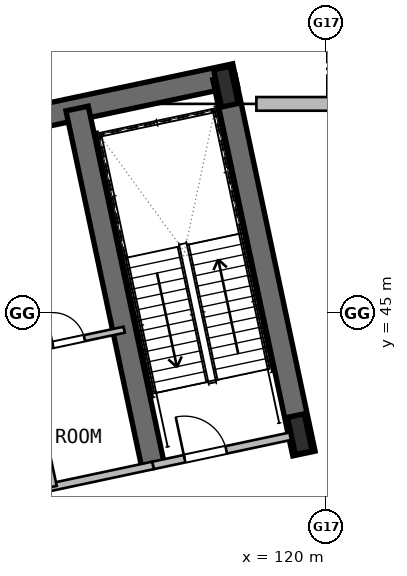
"""IFC4 building model, lengths in metres.
Left out: names, types, materials, properties, quantities, classifications, styles, units other than length and angle.
Written with IfcOpenShell. Run it as: python <this file> out.ifc"""

import sys

from ifc_helpers import new_model, si_unit, direction, frame, frame_2d, origin, origin_2d, place, context, subcontext, project, spatial, rectangle, i_section, extrude, element, fill, save


model = new_model("IFC4")
c1 = context("Model", 3, precision=1e-05, world=origin(), true_north=direction((0.0, 1.0)))
c2 = subcontext(c1, "Body", "Model", "MODEL_VIEW")
j1 = project(units=[si_unit("LENGTHUNIT", "METRE"), si_unit("PLANEANGLEUNIT", "RADIAN")], contexts=[c1])
p1 = place(None, origin())
s1 = spatial("IfcSite", under=j1, at=p1, CompositionType="ELEMENT")
p2 = place(p1, origin())
s2 = spatial("IfcBuilding", under=s1, at=p2, CompositionType="ELEMENT")
p3 = place(p2, frame((0.0, 0.0, 15.6)))
s3 = spatial("IfcBuildingStorey", under=s2, at=p3, CompositionType="ELEMENT", Elevation=15.6)
p4 = place(p3, frame((96.463, 46.77, 0.0), z_axis=(0.0, 0.0, 1.0), x_axis=(0.978147272959, 0.207913232873, 0.0)))
e1 = element("IfcWall", 1, at=p4, inside=s3, PredefinedType="SHEAR", context=c2, shape_type="SweptSolid", body=[
    extrude(rectangle(XDim=21.6, YDim=0.6, at=frame_2d((10.8, 0.0))), origin(), (0.0, 0.0, 1.0), 4.8),
])
p5 = place(p3, frame((119.402, 41.3, 0.0), z_axis=(0.0, 0.0, 1.0), x_axis=(-0.207904342798, 0.978149162575, 0.0)))
e2 = element("IfcWall", 2, at=p5, inside=s3, PredefinedType="SHEAR", context=c2, shape_type="SweptSolid", body=[
    extrude(rectangle(XDim=10.12, YDim=0.6, at=frame_2d((5.06, 0.0))), origin(), (0.0, 0.0, 1.0), 4.8),
])
p6 = place(p3, frame((115.43, 40.987, 0.0), z_axis=(0.0, 0.0, 1.0), x_axis=(-0.207903162969, 0.978149413345, 0.0)))
e3 = element("IfcWall", 3, at=p6, inside=s3, PredefinedType="SHEAR", context=c2, shape_type="SweptSolid", body=[
    extrude(rectangle(XDim=9.6, YDim=0.6, at=frame_2d((4.8, 0.0))), origin(), (0.0, 0.0, 1.0), 4.8),
])
for number, where, z_axis, x_axis in (
    (4, (119.293, 41.809, 0.0), (0.0, 0.0, 1.0), (0.978, 0.208, 0.0)),
    (5, (117.349, 50.954, 0.0), (0.0, 0.0, 1.0), (0.978, 0.208, 0.0)),
):
    element("IfcColumn", number, at=place(p3, frame(where, z_axis=z_axis, x_axis=x_axis)), inside=s3, PredefinedType="COLUMN", context=c2, shape_type="SweptSolid", body=[
        extrude(i_section(OverallWidth=0.45, OverallDepth=1.0, WebThickness=0.022, FlangeThickness=0.04, at=origin_2d()), origin(), (0.0, 0.0, 1.0), 4.8),
    ])
p7 = place(p3, frame((118.15, 50.5, 0.0), z_axis=(0.0, 0.0, 1.0), x_axis=(1.0, 0.0, 0.0)))
e6 = element("IfcWall", 6, at=p7, inside=s3, PredefinedType="SOLIDWALL", context=c2, shape_type="SweptSolid", body=[
    extrude(rectangle(XDim=24.53, YDim=0.36, at=frame_2d((12.265, 0.0))), origin(), (0.0, 0.0, 1.0), 4.48),
])
p8 = place(p3, frame((115.43, 40.987, 0.0), z_axis=(0.0, 0.0, 1.0), x_axis=(0.978146596989, 0.207916413008, 0.0)))
e7 = element("IfcWall", 7, at=p8, inside=s3, PredefinedType="PARTITIONING", context=c2, shape_type="SweptSolid", body=[
    extrude(rectangle(XDim=3.95, YDim=0.2, at=frame_2d((1.975, 0.0))), origin(), (0.0, 0.0, 1.0), 3.68),
])
p9 = place(p8, frame((0.85, 0.0, 0.0)))
e8 = element("IfcOpeningElement", 8, at=p9, cuts=e7, PredefinedType="OPENING", context=c2, shape_type="SweptSolid", body=[
    extrude(rectangle(XDim=1.12, YDim=2.1, at=frame_2d((0.56, 1.05))), frame((0.0, 0.11, 0.0), z_axis=(0.0, -1.0, 0.0), x_axis=(1.0, 0.0, 0.0)), (0.0, 0.0, 1.0), 0.22),
])
p10 = place(p3, frame((106.186, 39.022, 0.0), z_axis=(0.0, 0.0, 1.0), x_axis=(0.978145519981, 0.20792147975, 0.0)))
e9 = element("IfcWall", 9, at=p10, inside=s3, PredefinedType="PARTITIONING", context=c2, shape_type="SweptSolid", body=[
    extrude(rectangle(XDim=9.45, YDim=0.2, at=frame_2d((4.725, 0.0))), origin(), (0.0, 0.0, 1.0), 3.68),
])
p11 = place(p10, frame((0.55, 0.0, 0.0)))
e10 = element("IfcOpeningElement", 10, at=p11, cuts=e9, PredefinedType="OPENING", context=c2, shape_type="SweptSolid", body=[
    extrude(rectangle(XDim=1.05, YDim=2.1, at=frame_2d((0.525, 1.05))), frame((0.0, 0.11, 0.0), z_axis=(0.0, -1.0, 0.0), x_axis=(1.0, 0.0, 0.0)), (0.0, 0.0, 1.0), 0.22),
])
p12 = place(p3, frame((112.818, 40.432, 0.0), z_axis=(0.0, 0.0, 1.0), x_axis=(-0.207884354546, 0.978153410838, 0.0)))
e11 = element("IfcWall", 11, at=p12, inside=s3, PredefinedType="PARTITIONING", context=c2, shape_type="SweptSolid", body=[
    extrude(rectangle(XDim=3.65, YDim=0.16, at=frame_2d((1.825, 0.0))), origin(), (0.0, 0.0, 1.0), 4.48),
])
p13 = place(p3, frame((109.682, 43.497, 0.0), z_axis=(0.0, 0.0, 1.0), x_axis=(0.978149238447, 0.207903985835, 0.0)))
e12 = element("IfcWall", 12, at=p13, inside=s3, PredefinedType="PARTITIONING", context=c2, shape_type="SweptSolid", body=[
    extrude(rectangle(XDim=5.1, YDim=0.16, at=frame_2d((2.55, 0.0))), origin(), (0.0, 0.0, 1.0), 4.48),
])
p14 = place(p13, frame((0.81, 0.0, 0.0)))
e13 = element("IfcOpeningElement", 13, at=p14, cuts=e12, PredefinedType="OPENING", context=c2, shape_type="SweptSolid", body=[
    extrude(rectangle(XDim=0.85, YDim=2.05, at=frame_2d((0.425, 1.025))), frame((0.0, 0.09, 0.0), z_axis=(0.0, -1.0, 0.0), x_axis=(1.0, 0.0, 0.0)), (0.0, 0.0, 1.0), 0.18),
])
p15 = place(p13, frame((3.18, 0.0, 0.0)))
e14 = element("IfcOpeningElement", 14, at=p15, cuts=e12, PredefinedType="OPENING", context=c2, shape_type="SweptSolid", body=[
    extrude(rectangle(XDim=0.85, YDim=2.05, at=frame_2d((0.425, 1.025))), frame((0.0, 0.09, 0.0), z_axis=(0.0, -1.0, 0.0), x_axis=(1.0, 0.0, 0.0)), (0.0, 0.0, 1.0), 0.18),
])
p16 = place(p9, origin())
e15 = element("IfcDoor", 15, at=p16, inside=s3, OperationType="SINGLE_SWING_RIGHT", PredefinedType="DOOR", context=c2, shape_type="SweptSolid", body=[
    extrude(rectangle(XDim=1.12, YDim=2.1, at=frame_2d((0.56, 1.05))), frame((0.0, 0.025, 0.0), z_axis=(0.0, -1.0, 0.0), x_axis=(1.0, 0.0, 0.0)), (0.0, 0.0, 1.0), 0.05),
])
fill(e8, e15)
p17 = place(p15, origin())
e16 = element("IfcDoor", 16, at=p17, inside=s3, OperationType="SINGLE_SWING_LEFT", PredefinedType="DOOR", context=c2, shape_type="SweptSolid", body=[
    extrude(rectangle(XDim=0.85, YDim=2.05, at=frame_2d((0.425, 1.025))), frame((0.0, 0.025, 0.0), z_axis=(0.0, -1.0, 0.0), x_axis=(1.0, 0.0, 0.0)), (0.0, 0.0, 1.0), 0.05),
])
fill(e14, e16)
save(model, sys.argv[1])
